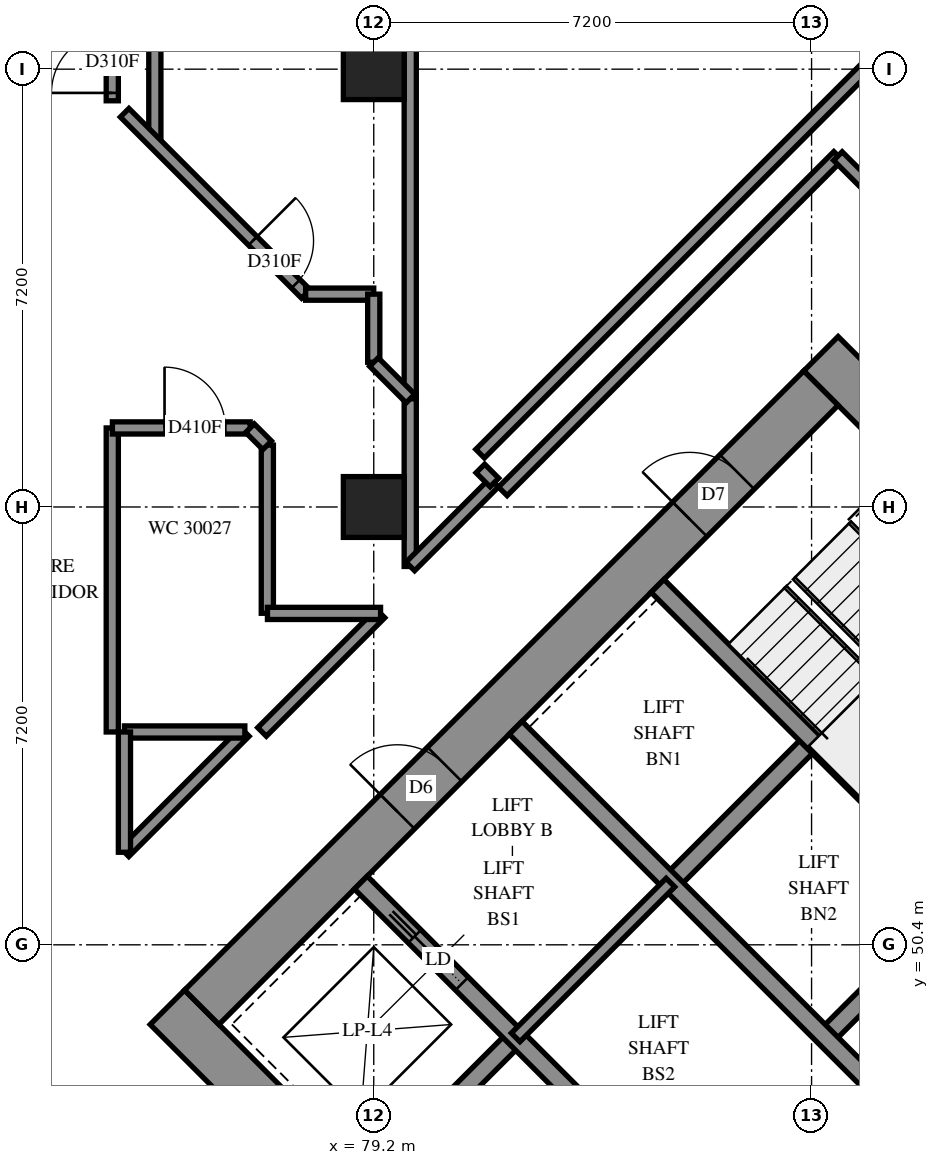
"""IFC4 building model, lengths in metres.
Left out: names, types, materials, properties, quantities, classifications, styles, units other than length and angle.
Written with IfcOpenShell. Run it as: python <this file> out.ifc"""

import sys

from ifc_helpers import new_model, si_unit, direction, frame, frame_2d, origin, origin_2d, place, context, subcontext, project, spatial, polyline, rectangle, outline, extrude, element, fill, save


model = new_model("IFC4")
c1 = context("Model", 3, precision=1e-05, world=origin(), true_north=direction((0.0, 1.0)))
c2 = subcontext(c1, "Body", "Model", "MODEL_VIEW")
j1 = project(units=[si_unit("LENGTHUNIT", "METRE"), si_unit("PLANEANGLEUNIT", "RADIAN")], contexts=[c1])
p1 = place(None, origin())
s1 = spatial("IfcSite", under=j1, at=p1, CompositionType="ELEMENT")
p2 = place(p1, origin())
s2 = spatial("IfcBuilding", under=s1, at=p2, CompositionType="ELEMENT")
p3 = place(p2, frame((0.0, 0.0, 111.8)))
s3 = spatial("IfcBuildingStorey", under=s2, at=p3, CompositionType="ELEMENT", Elevation=111.8)
for number, where, z_axis, x_axis in (
    (1, (79.2, 57.6, 0.0), (0.0, 0.0, 1.0), (1.0, 0.0, 0.0)),
    (2, (79.2, 64.8, 0.0), (0.0, 0.0, 1.0), (1.0, 0.0, 0.0)),
):
    element("IfcColumn", number, at=place(p3, frame(where, z_axis=z_axis, x_axis=x_axis)), inside=s3, PredefinedType="COLUMN", context=c2, shape_type="SweptSolid", body=[
        extrude(rectangle(XDim=1.0, YDim=1.0, at=origin_2d()), origin(), (0.0, 0.0, 1.0), 3.1),
    ])
p4 = place(p3, frame((75.806, 49.373, -0.3), z_axis=(0.0, 0.0, 1.0), x_axis=(0.7071067812, -0.7071067812, 0.0)))
e3 = element("IfcWall", 3, at=p4, inside=s3, PredefinedType="SHEAR", context=c2, shape_type="SweptSolid", body=[
    extrude(rectangle(XDim=16.0, YDim=0.8, at=frame_2d((8.0, 0.0))), origin(), (0.0, 0.0, 1.0), 2.7),
])
p5 = place(p3, frame((86.554, 60.121, -0.3), z_axis=(0.0, 0.0, 1.0), x_axis=(0.7071067812, -0.7071067812, 0.0)))
e4 = element("IfcWall", 4, at=p5, inside=s3, PredefinedType="SHEAR", context=c2, shape_type="SweptSolid", body=[
    extrude(rectangle(XDim=16.0, YDim=0.8, at=frame_2d((8.0, 0.0))), origin(), (0.0, 0.0, 1.0), 2.7),
])
p6 = place(p5, frame((10.8, 0.0, 0.3)))
e5 = element("IfcOpeningElement", 5, at=p6, cuts=e4, PredefinedType="OPENING", context=c2, shape_type="SweptSolid", body=[
    extrude(rectangle(XDim=0.8, YDim=2.1, at=frame_2d((0.4, 1.05))), frame((0.0, 0.41, 0.0), z_axis=(0.0, -1.0, 0.0), x_axis=(1.0, 0.0, 0.0)), (0.0, 0.0, 1.0), 0.82),
])
p7 = place(p3, frame((76.372, 49.373, -0.3), z_axis=(0.0, 0.0, 1.0), x_axis=(0.7071067812, 0.7071067812, 0.0)))
e6 = element("IfcWall", 6, at=p7, inside=s3, PredefinedType="SHEAR", context=c2, shape_type="SweptSolid", body=[
    extrude(rectangle(XDim=14.4, YDim=0.8, at=frame_2d((7.2, 0.0))), origin(), (0.0, 0.0, 1.0), 2.7),
])
p8 = place(p7, frame((4.55, 0.0, 0.3)))
e7 = element("IfcOpeningElement", 7, at=p8, cuts=e6, PredefinedType="OPENING", context=c2, shape_type="SweptSolid", body=[
    extrude(rectangle(XDim=1.1, YDim=2.1, at=frame_2d((0.55, 1.05))), frame((0.0, 0.41, 0.0), z_axis=(0.0, -1.0, 0.0), x_axis=(1.0, 0.0, 0.0)), (0.0, 0.0, 1.0), 0.82),
])
p9 = place(p7, frame((11.35, 0.0, 0.3)))
e8 = element("IfcOpeningElement", 8, at=p9, cuts=e6, PredefinedType="OPENING", context=c2, shape_type="SweptSolid", body=[
    extrude(rectangle(XDim=1.1, YDim=2.1, at=frame_2d((0.55, 1.05))), frame((0.0, 0.41, 0.0), z_axis=(0.0, -1.0, 0.0), x_axis=(1.0, 0.0, 0.0)), (0.0, 0.0, 1.0), 0.82),
])
p10 = place(p3, frame((87.12, 38.625, -0.3), z_axis=(0.0, 0.0, 1.0), x_axis=(0.7071067812, 0.7071067812, 0.0)))
e9 = element("IfcWall", 9, at=p10, inside=s3, PredefinedType="SHEAR", context=c2, shape_type="SweptSolid", body=[
    extrude(rectangle(XDim=14.4, YDim=0.8, at=frame_2d((7.2, 0.0))), origin(), (0.0, 0.0, 1.0), 2.7),
])
p11 = place(p10, frame((4.55, 0.0, 0.3)))
e10 = element("IfcOpeningElement", 10, at=p11, cuts=e9, PredefinedType="OPENING", context=c2, shape_type="SweptSolid", body=[
    extrude(rectangle(XDim=1.1, YDim=2.1, at=frame_2d((0.55, 1.05))), frame((0.0, 0.41, 0.0), z_axis=(0.0, -1.0, 0.0), x_axis=(1.0, 0.0, 0.0)), (0.0, 0.0, 1.0), 0.82),
])
p12 = place(p10, frame((11.35, 0.0, 0.3)))
e11 = element("IfcOpeningElement", 11, at=p12, cuts=e9, PredefinedType="OPENING", context=c2, shape_type="SweptSolid", body=[
    extrude(rectangle(XDim=1.1, YDim=2.1, at=frame_2d((0.55, 1.05))), frame((0.0, 0.41, 0.0), z_axis=(0.0, -1.0, 0.0), x_axis=(1.0, 0.0, 0.0)), (0.0, 0.0, 1.0), 0.82),
])
for number, where, z_axis, x_axis in (
    (12, (79.2, 46.544, 0.0), (0.0, 0.0, 1.0), (0.707, 0.707, 0.0)),
    (13, (84.079, 51.423, 0.0), (0.0, 0.0, 1.0), (0.707, 0.707, 0.0)),
):
    element("IfcWall", number, at=place(p3, frame(where, z_axis=z_axis, x_axis=x_axis)), inside=s3, PredefinedType="SOLIDWALL", context=c2, shape_type="SweptSolid", body=[
        extrude(rectangle(XDim=3.3, YDim=0.3, at=frame_2d((1.65, 0.0))), origin(), (0.0, 0.0, 1.0), 3.1),
    ])
p13 = place(p3, frame((86.625, 48.878, 0.0), z_axis=(0.0, 0.0, 1.0), x_axis=(0.7071067812, 0.7071067812, 0.0)))
e14 = element("IfcWall", 14, at=p13, inside=s3, PredefinedType="SOLIDWALL", context=c2, shape_type="SweptSolid", body=[
    extrude(rectangle(XDim=3.3, YDim=0.3, at=frame_2d((1.65, 0.0))), origin(), (0.0, 0.0, 1.0), 3.1),
])
p14 = place(p3, frame((78.988, 51.423, 0.0), z_axis=(0.0, 0.0, 1.0), x_axis=(0.7071067812, -0.7071067812, 0.0)))
e15 = element("IfcWall", 15, at=p14, inside=s3, PredefinedType="SOLIDWALL", context=c2, shape_type="SweptSolid", body=[
    extrude(rectangle(XDim=14.4, YDim=0.3, at=frame_2d((7.2, 0.0))), origin(), (0.0, 0.0, 1.0), 3.1),
])
p15 = place(p14, frame((1.25, 0.0, 0.0)))
e16 = element("IfcOpeningElement", 16, at=p15, cuts=e15, PredefinedType="OPENING", context=c2, shape_type="SweptSolid", body=[
    extrude(rectangle(XDim=1.1, YDim=2.1, at=frame_2d((0.55, 1.05))), frame((0.0, 0.16, 0.0), z_axis=(0.0, -1.0, 0.0), x_axis=(1.0, 0.0, 0.0)), (0.0, 0.0, 1.0), 0.32),
])
p16 = place(p14, frame((4.85, 0.0, 0.0)))
e17 = element("IfcOpeningElement", 17, at=p16, cuts=e15, PredefinedType="OPENING", context=c2, shape_type="SweptSolid", body=[
    extrude(rectangle(XDim=1.1, YDim=2.1, at=frame_2d((0.55, 1.05))), frame((0.0, 0.16, 0.0), z_axis=(0.0, -1.0, 0.0), x_axis=(1.0, 0.0, 0.0)), (0.0, 0.0, 1.0), 0.32),
])
p17 = place(p14, frame((8.45, 0.0, 0.0)))
e18 = element("IfcOpeningElement", 18, at=p17, cuts=e15, PredefinedType="OPENING", context=c2, shape_type="SweptSolid", body=[
    extrude(rectangle(XDim=1.1, YDim=2.1, at=frame_2d((0.55, 1.05))), frame((0.0, 0.16, 0.0), z_axis=(0.0, -1.0, 0.0), x_axis=(1.0, 0.0, 0.0)), (0.0, 0.0, 1.0), 0.32),
])
p18 = place(p14, frame((12.05, 0.0, 0.0)))
e19 = element("IfcOpeningElement", 19, at=p18, cuts=e15, PredefinedType="OPENING", context=c2, shape_type="SweptSolid", body=[
    extrude(rectangle(XDim=1.1, YDim=2.1, at=frame_2d((0.55, 1.05))), frame((0.0, 0.16, 0.0), z_axis=(0.0, -1.0, 0.0), x_axis=(1.0, 0.0, 0.0)), (0.0, 0.0, 1.0), 0.32),
])
p19 = place(p3, frame((81.534, 53.969, 0.0), z_axis=(0.0, 0.0, 1.0), x_axis=(0.707103309, -0.7071102534, 0.0)))
e20 = element("IfcWall", 20, at=p19, inside=s3, PredefinedType="SOLIDWALL", context=c2, shape_type="SweptSolid", body=[
    extrude(rectangle(XDim=14.4, YDim=0.3, at=frame_2d((7.2, 0.0))), origin(), (0.0, 0.0, 1.0), 3.1),
])
p20 = place(p19, frame((12.05, 0.0, 0.0)))
e21 = element("IfcOpeningElement", 21, at=p20, cuts=e20, PredefinedType="OPENING", context=c2, shape_type="SweptSolid", body=[
    extrude(rectangle(XDim=1.1, YDim=2.1, at=frame_2d((0.55, 1.05))), frame((0.0, 0.16, 0.0), z_axis=(0.0, -1.0, 0.0), x_axis=(1.0, 0.0, 0.0)), (0.0, 0.0, 1.0), 0.32),
])
p21 = place(p3, frame((83.867, 56.302, 0.0), z_axis=(0.0, 0.0, 1.0), x_axis=(0.7071137256, -0.7070998367, 0.0)))
e22 = element("IfcWall", 22, at=p21, inside=s3, PredefinedType="SOLIDWALL", context=c2, shape_type="SweptSolid", body=[
    extrude(rectangle(XDim=7.2, YDim=0.3, at=frame_2d((3.6, 0.0))), origin(), (0.0, 0.0, 1.0), 3.1),
])
p22 = place(p3, frame((89.215, 64.097, 0.0), z_axis=(0.0, 0.0, 1.0), x_axis=(-0.8142407991, 0.5805272785, 0.0)))
e23 = element("IfcWall", 23, at=p22, inside=s3, PredefinedType="SOLIDWALL", context=c2, shape_type="SweptSolid", body=[
    extrude(outline(polyline([(-0.046, -0.275), (3.414, -0.275), (3.507, 0.275), (0.046, 0.275), (-0.046, -0.275)])), origin(), (0.0, 0.0, 1.0), 3.1),
])
p23 = place(p22, frame((0.471, 0.0, 0.5)))
e24 = element("IfcOpeningElement", 24, at=p23, cuts=e23, PredefinedType="OPENING", context=c2, shape_type="SweptSolid", body=[
    extrude(rectangle(XDim=1.2, YDim=2.45, at=frame_2d((0.6, 1.225))), frame((0.0, 0.285, 0.0), z_axis=(0.0, -1.0, 0.0), x_axis=(1.0, 0.0, 0.0)), (0.0, 0.0, 1.0), 0.57),
])
p24 = place(p3, frame((81.534, 48.878, 0.0), z_axis=(0.0, 0.0, 1.0), x_axis=(0.707092892, 0.7071206701, 0.0)))
e25 = element("IfcWall", 25, at=p24, inside=s3, PredefinedType="PARTITIONING", context=c2, shape_type="SweptSolid", body=[
    extrude(rectangle(XDim=3.6, YDim=0.2, at=frame_2d((1.8, 0.0))), origin(), (0.0, 0.0, 1.0), 3.1),
])
p25 = place(p3, frame((79.8, 59.38, 0.0), z_axis=(0.0, 0.0, 1.0), x_axis=(0.0, 1.0, 0.0)))
e26 = element("IfcWall", 26, at=p25, inside=s3, PredefinedType="PARTITIONING", context=c2, shape_type="SweptSolid", body=[
    extrude(rectangle(XDim=13.62, YDim=0.2, at=frame_2d((6.81, 0.0))), origin(), (0.0, 0.0, 1.0), 3.1),
])
p26 = place(p3, frame((80.949, 58.477, 0.0), z_axis=(0.0, 0.0, 1.0), x_axis=(0.7071122005, 0.7071013619, 0.0)))
e27 = element("IfcWall", 27, at=p26, inside=s3, PredefinedType="PARTITIONING", context=c2, shape_type="SweptSolid", body=[
    extrude(rectangle(XDim=9.226, YDim=0.2, at=frame_2d((4.613, 0.0))), origin(), (0.0, 0.0, 1.0), 3.1),
])
p27 = place(p3, frame((75.6, 63.58, 0.0), z_axis=(0.0, 0.0, 1.0), x_axis=(0.0, 1.0, 0.0)))
e28 = element("IfcWall", 28, at=p27, inside=s3, PredefinedType="PARTITIONING", context=c2, shape_type="SweptSolid", body=[
    extrude(rectangle(XDim=9.18, YDim=0.2, at=frame_2d((4.59, 0.0))), origin(), (0.0, 0.0, 1.0), 3.1),
])
p28 = place(p3, frame((81.322, 57.858, 0.0), z_axis=(0.0, 0.0, 1.0), x_axis=(0.7069785544, 0.7072349848, 0.0)))
e29 = element("IfcWall", 29, at=p28, inside=s3, PredefinedType="PARTITIONING", context=c2, shape_type="SweptSolid", body=[
    extrude(rectangle(XDim=7.799, YDim=0.2, at=frame_2d((3.9, 0.0))), origin(), (0.0, 0.0, 1.0), 3.1),
])
p29 = place(p3, frame((74.9, 53.9, 0.0), z_axis=(0.0, 0.0, 1.0), x_axis=(0.0, 1.0, 0.0)))
e30 = element("IfcWall", 30, at=p29, inside=s3, PredefinedType="PARTITIONING", context=c2, shape_type="SweptSolid", body=[
    extrude(rectangle(XDim=5.0, YDim=0.2, at=frame_2d((2.5, 0.0))), origin(), (0.0, 0.0, 1.0), 3.1),
])
p30 = place(p3, frame((75.103, 64.083, 0.0), z_axis=(0.0, 0.0, 1.0), x_axis=(0.7071067812, -0.7071067812, 0.0)))
e31 = element("IfcWall", 31, at=p30, inside=s3, PredefinedType="PARTITIONING", context=c2, shape_type="SweptSolid", body=[
    extrude(rectangle(XDim=4.214, YDim=0.2, at=frame_2d((2.107, 0.0))), origin(), (0.0, 0.0, 1.0), 3.1),
])
p31 = place(p30, frame((2.979, 0.0, 0.0)))
e32 = element("IfcOpeningElement", 32, at=p31, cuts=e31, PredefinedType="OPENING", context=c2, shape_type="SweptSolid", body=[
    extrude(rectangle(XDim=1.0, YDim=2.1, at=frame_2d((0.5, 1.05))), frame((0.0, 0.11, 0.0), z_axis=(0.0, -1.0, 0.0), x_axis=(1.0, 0.0, 0.0)), (0.0, 0.0, 1.0), 0.22),
])
p32 = place(p3, frame((74.9, 64.28, 0.0), z_axis=(0.0, 0.0, 1.0), x_axis=(0.0, 1.0, 0.0)))
e33 = element("IfcWall", 33, at=p32, inside=s3, PredefinedType="PARTITIONING", context=c2, shape_type="SweptSolid", body=[
    extrude(rectangle(XDim=3.42, YDim=0.2, at=frame_2d((1.71, 0.0))), origin(), (0.0, 0.0, 1.0), 3.1),
])
p33 = place(p32, frame((0.13, 0.0, 0.0)))
e34 = element("IfcOpeningElement", 34, at=p33, cuts=e33, PredefinedType="OPENING", context=c2, shape_type="SweptSolid", body=[
    extrude(rectangle(XDim=1.0, YDim=2.1, at=frame_2d((0.5, 1.05))), frame((0.0, 0.11, 0.0), z_axis=(0.0, -1.0, 0.0), x_axis=(1.0, 0.0, 0.0)), (0.0, 0.0, 1.0), 0.22),
])
p34 = place(p3, frame((86.833, 63.371, 0.0), z_axis=(0.0, 0.0, 1.0), x_axis=(0.7071067812, -0.7071067812, 0.0)))
e35 = element("IfcWall", 35, at=p34, inside=s3, PredefinedType="PARTITIONING", context=c2, shape_type="SweptSolid", body=[
    extrude(rectangle(XDim=2.893, YDim=0.2, at=frame_2d((1.447, 0.0))), origin(), (0.0, 0.0, 1.0), 3.1),
])
p35 = place(p3, frame((75.102, 51.922, 0.0), z_axis=(0.0, 0.0, 1.0), x_axis=(0.7071067812, 0.7071067812, 0.0)))
e36 = element("IfcWall", 36, at=p35, inside=s3, PredefinedType="PARTITIONING", context=c2, shape_type="SweptSolid", body=[
    extrude(rectangle(XDim=2.797, YDim=0.2, at=frame_2d((1.399, 0.0))), origin(), (0.0, 0.0, 1.0), 3.1),
])
p36 = place(p3, frame((77.45, 55.852, 0.0), z_axis=(0.0, 0.0, 1.0), x_axis=(0.0, 1.0, 0.0)))
e37 = element("IfcWall", 37, at=p36, inside=s3, PredefinedType="PARTITIONING", context=c2, shape_type="SweptSolid", body=[
    extrude(rectangle(XDim=2.766, YDim=0.2, at=frame_2d((1.383, 0.0))), origin(), (0.0, 0.0, 1.0), 3.1),
])
p37 = place(p3, frame((79.8, 56.622, 0.0), z_axis=(0.0, 0.0, 1.0), x_axis=(0.0, 1.0, 0.0)))
e38 = element("IfcWall", 38, at=p37, inside=s3, PredefinedType="PARTITIONING", context=c2, shape_type="SweptSolid", body=[
    extrude(rectangle(XDim=2.758, YDim=0.2, at=frame_2d((1.379, 0.0))), origin(), (0.0, 0.0, 1.0), 3.1),
])
p38 = place(p3, frame((77.363, 53.901, 0.0), z_axis=(0.0, 0.0, 1.0), x_axis=(0.7071067812, 0.7071067812, 0.0)))
e39 = element("IfcWall", 39, at=p38, inside=s3, PredefinedType="PARTITIONING", context=c2, shape_type="SweptSolid", body=[
    extrude(rectangle(XDim=2.755, YDim=0.2, at=frame_2d((1.377, 0.0))), origin(), (0.0, 0.0, 1.0), 3.1),
])
p39 = place(p3, frame((74.902, 58.9, 0.0), z_axis=(0.0, 0.0, 1.0), x_axis=(1.0, 0.0, 0.0)))
e40 = element("IfcWall", 40, at=p39, inside=s3, PredefinedType="PARTITIONING", context=c2, shape_type="SweptSolid", body=[
    extrude(rectangle(XDim=2.266, YDim=0.2, at=frame_2d((1.133, 0.0))), origin(), (0.0, 0.0, 1.0), 3.1),
])
p40 = place(p39, frame((0.858, 0.0, 0.0)))
e41 = element("IfcOpeningElement", 41, at=p40, cuts=e40, PredefinedType="OPENING", context=c2, shape_type="SweptSolid", body=[
    extrude(rectangle(XDim=1.0, YDim=2.1, at=frame_2d((0.5, 1.05))), frame((0.0, 0.11, 0.0), z_axis=(0.0, -1.0, 0.0), x_axis=(1.0, 0.0, 0.0)), (0.0, 0.0, 1.0), 0.22),
])
p41 = place(p3, frame((75.1, 53.9, 0.0), z_axis=(0.0, 0.0, 1.0), x_axis=(1.0, 0.0, 0.0)))
e42 = element("IfcWall", 42, at=p41, inside=s3, PredefinedType="PARTITIONING", context=c2, shape_type="SweptSolid", body=[
    extrude(rectangle(XDim=1.98, YDim=0.2, at=frame_2d((0.99, 0.0))), origin(), (0.0, 0.0, 1.0), 3.1),
])
p42 = place(p3, frame((75.1, 51.922, 0.0), z_axis=(0.0, 0.0, 1.0), x_axis=(0.0, 1.0, 0.0)))
e43 = element("IfcWall", 43, at=p42, inside=s3, PredefinedType="PARTITIONING", context=c2, shape_type="SweptSolid", body=[
    extrude(rectangle(XDim=1.978, YDim=0.2, at=frame_2d((0.989, 0.0))), origin(), (0.0, 0.0, 1.0), 3.1),
])
p43 = place(p3, frame((79.802, 56.623, 0.0), z_axis=(0.0, 0.0, 1.0), x_axis=(0.7071067812, 0.7071067812, 0.0)))
e44 = element("IfcWall", 44, at=p43, inside=s3, PredefinedType="PARTITIONING", context=c2, shape_type="SweptSolid", body=[
    extrude(rectangle(XDim=1.949, YDim=0.2, at=frame_2d((0.974, 0.0))), origin(), (0.0, 0.0, 1.0), 3.1),
])
p44 = place(p3, frame((77.452, 55.85, 0.0), z_axis=(0.0, 0.0, 1.0), x_axis=(1.0, 0.0, 0.0)))
e45 = element("IfcWall", 45, at=p44, inside=s3, PredefinedType="PARTITIONING", context=c2, shape_type="SweptSolid", body=[
    extrude(rectangle(XDim=1.86, YDim=0.2, at=frame_2d((0.93, 0.0))), origin(), (0.0, 0.0, 1.0), 3.1),
])
for number, where, z_axis, x_axis in (
    (46, (78.08, 61.1, 0.0), (0.0, 0.0, 1.0), (1.0, 0.0, 0.0)),
    (47, (79.2, 59.98, 0.0), (0.0, 0.0, 1.0), (0.0, 1.0, 0.0)),
):
    element("IfcWall", number, at=place(p3, frame(where, z_axis=z_axis, x_axis=x_axis)), inside=s3, PredefinedType="PARTITIONING", context=c2, shape_type="SweptSolid", body=[
        extrude(rectangle(XDim=1.12, YDim=0.2, at=frame_2d((0.56, 0.0))), origin(), (0.0, 0.0, 1.0), 3.1),
    ])
p45 = place(p3, frame((79.203, 59.983, 0.0), z_axis=(0.0, 0.0, 1.0), x_axis=(0.7071067812, -0.7071067812, 0.0)))
e48 = element("IfcWall", 48, at=p45, inside=s3, PredefinedType="PARTITIONING", context=c2, shape_type="SweptSolid", body=[
    extrude(rectangle(XDim=0.849, YDim=0.2, at=frame_2d((0.424, 0.0))), origin(), (0.0, 0.0, 1.0), 3.1),
])
p46 = place(p3, frame((77.165, 58.897, 0.0), z_axis=(0.0, 0.0, 1.0), x_axis=(0.7071067812, -0.7071067812, 0.0)))
e49 = element("IfcWall", 49, at=p46, inside=s3, PredefinedType="PARTITIONING", context=c2, shape_type="SweptSolid", body=[
    extrude(rectangle(XDim=0.399, YDim=0.2, at=frame_2d((0.199, 0.0))), origin(), (0.0, 0.0, 1.0), 3.1),
])
p47 = place(p3, frame((80.953, 58.233, 0.0), z_axis=(0.0, 0.0, 1.0), x_axis=(0.7071067812, -0.7071067812, 0.0)))
e50 = element("IfcWall", 50, at=p47, inside=s3, PredefinedType="PARTITIONING", context=c2, shape_type="SweptSolid", body=[
    extrude(rectangle(XDim=0.325, YDim=0.2, at=frame_2d((0.163, 0.0))), origin(), (0.0, 0.0, 1.0), 3.1),
])
p48 = place(p8, origin())
e51 = element("IfcDoor", 51, at=p48, inside=s3, OperationType="DOUBLE_DOOR_SINGLE_SWING", PredefinedType="DOOR", context=c2, shape_type="SweptSolid", body=[
    extrude(rectangle(XDim=1.1, YDim=2.1, at=frame_2d((0.55, 1.05))), frame((0.0, 0.025, 0.0), z_axis=(0.0, -1.0, 0.0), x_axis=(1.0, 0.0, 0.0)), (0.0, 0.0, 1.0), 0.05),
])
fill(e7, e51)
p49 = place(p9, origin())
e52 = element("IfcDoor", 52, at=p49, inside=s3, OperationType="SINGLE_SWING_LEFT", PredefinedType="DOOR", context=c2, shape_type="SweptSolid", body=[
    extrude(rectangle(XDim=1.1, YDim=2.1, at=frame_2d((0.55, 1.05))), frame((0.0, 0.025, 0.0), z_axis=(0.0, -1.0, 0.0), x_axis=(1.0, 0.0, 0.0)), (0.0, 0.0, 1.0), 0.05),
])
fill(e8, e52)
p50 = place(p15, origin())
e53 = element("IfcDoor", 53, at=p50, inside=s3, OperationType="SLIDING_TO_LEFT", PredefinedType="DOOR", context=c2, shape_type="SweptSolid", body=[
    extrude(rectangle(XDim=1.1, YDim=2.1, at=frame_2d((0.55, 1.05))), frame((0.0, 0.025, 0.0), z_axis=(0.0, -1.0, 0.0), x_axis=(1.0, 0.0, 0.0)), (0.0, 0.0, 1.0), 0.05),
])
fill(e16, e53)
p51 = place(p40, origin())
e54 = element("IfcDoor", 54, at=p51, inside=s3, OperationType="SINGLE_SWING_RIGHT", PredefinedType="DOOR", context=c2, shape_type="SweptSolid", body=[
    extrude(rectangle(XDim=1.0, YDim=2.1, at=frame_2d((0.5, 1.05))), frame((0.0, 0.025, 0.0), z_axis=(0.0, -1.0, 0.0), x_axis=(1.0, 0.0, 0.0)), (0.0, 0.0, 1.0), 0.05),
])
fill(e41, e54)
p52 = place(p33, origin())
e55 = element("IfcDoor", 55, at=p52, inside=s3, OperationType="SINGLE_SWING_RIGHT", PredefinedType="DOOR", context=c2, shape_type="SweptSolid", body=[
    extrude(rectangle(XDim=1.0, YDim=2.1, at=frame_2d((0.5, 1.05))), frame((0.0, 0.025, 0.0), z_axis=(0.0, -1.0, 0.0), x_axis=(1.0, 0.0, 0.0)), (0.0, 0.0, 1.0), 0.05),
])
fill(e34, e55)
p53 = place(p31, origin())
e56 = element("IfcDoor", 56, at=p53, inside=s3, OperationType="SINGLE_SWING_LEFT", PredefinedType="DOOR", context=c2, shape_type="SweptSolid", body=[
    extrude(rectangle(XDim=1.0, YDim=2.1, at=frame_2d((0.5, 1.05))), frame((0.0, 0.025, 0.0), z_axis=(0.0, -1.0, 0.0), x_axis=(1.0, 0.0, 0.0)), (0.0, 0.0, 1.0), 0.05),
])
fill(e32, e56)
save(model, sys.argv[1])
